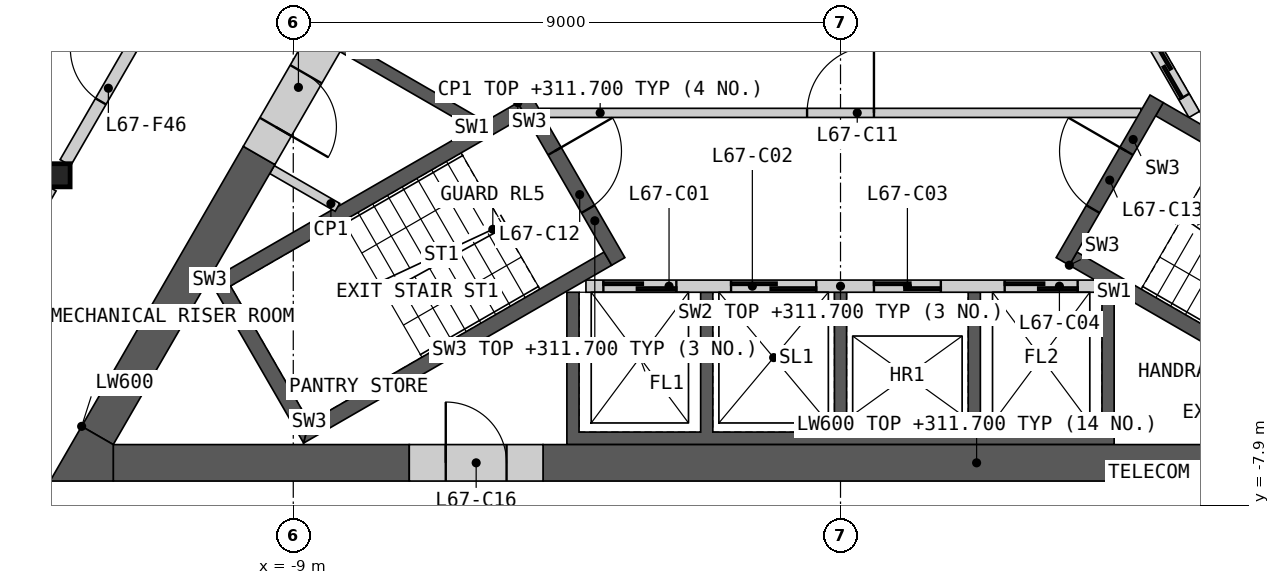
"""IFC4 building model, lengths in metres.
Left out: names, types, materials, properties, quantities, classifications, styles, units other than length and angle.
Written with IfcOpenShell. Run it as: python <this file> out.ifc"""

import sys

from ifc_helpers import new_model, si_unit, direction, frame, frame_2d, origin, origin_2d, place, context, subcontext, project, spatial, polyline, rectangle, i_section, outline, extrude, element, fill, save


model = new_model("IFC4")
c1 = context("Model", 3, precision=1e-05, world=origin(), true_north=direction((0.0, 1.0)))
c2 = subcontext(c1, "Body", "Model", "MODEL_VIEW")
j1 = project(units=[si_unit("LENGTHUNIT", "METRE"), si_unit("PLANEANGLEUNIT", "RADIAN")], contexts=[c1])
p1 = place(None, origin())
s1 = spatial("IfcSite", under=j1, at=p1, CompositionType="ELEMENT")
p2 = place(p1, origin())
s2 = spatial("IfcBuilding", under=s1, at=p2, CompositionType="ELEMENT")
p3 = place(p2, frame((0.0, 0.0, 308.6)))
s3 = spatial("IfcBuildingStorey", under=s2, at=p3, CompositionType="ELEMENT", Elevation=308.6)
p4 = place(p3, frame((-12.868, -2.476, 0.0), z_axis=(0.0, 0.0, 1.0), x_axis=(1.0, 0.0, 0.0)))
e1 = element("IfcColumn", 1, at=p4, inside=s3, PredefinedType="COLUMN", context=c2, shape_type="SweptSolid", body=[
    extrude(i_section(OverallWidth=0.396, OverallDepth=0.381, WebThickness=0.019, FlangeThickness=0.03, at=origin_2d()), origin(), (0.0, 0.0, 1.0), 3.4),
])
p5 = place(p3, origin())
e2 = element("IfcWall", 2, at=p5, inside=s3, PredefinedType="SHEAR", context=c2, shape_type="SweptSolid", body=[
    extrude(outline(polyline([(4.5, -4.4), (4.5, -6.906), (-4.5, -6.906), (-4.5, -4.4), (-4.3, -4.4), (-4.3, -6.7), (-2.3, -6.7), (-2.3, -4.4), (-2.1, -4.4), (-2.1, -6.7), (-0.1, -6.7), (-0.1, -4.4), (0.1, -4.4), (0.1, -6.7), (2.1, -6.7), (2.1, -4.4), (2.3, -4.4), (2.3, -6.7), (4.3, -6.7), (4.3, -4.4), (4.5, -4.4)])), origin(), (0.0, 0.0, 1.0), 3.1),
])
p6 = place(p3, frame((-4.187, -4.3, 0.0), z_axis=(0.0, 0.0, 1.0), x_axis=(1.0, 0.0, 0.0)))
e3 = element("IfcWall", 3, at=p6, inside=s3, PredefinedType="SOLIDWALL", context=c2, shape_type="SweptSolid", body=[
    extrude(rectangle(XDim=8.373, YDim=0.2, at=frame_2d((4.187, 0.0))), origin(), (0.0, 0.0, 1.0), 3.1),
])
p7 = place(p6, frame((0.287, 0.0, 0.0)))
e4 = element("IfcOpeningElement", 4, at=p7, cuts=e3, PredefinedType="OPENING", context=c2, shape_type="SweptSolid", body=[
    extrude(rectangle(XDim=1.2, YDim=2.1, at=frame_2d((0.6, 1.05))), frame((0.0, 0.11, 0.0), z_axis=(0.0, -1.0, 0.0), x_axis=(1.0, 0.0, 0.0)), (0.0, 0.0, 1.0), 0.22),
])
p8 = place(p6, frame((2.387, 0.0, 0.0)))
e5 = element("IfcOpeningElement", 5, at=p8, cuts=e3, PredefinedType="OPENING", context=c2, shape_type="SweptSolid", body=[
    extrude(rectangle(XDim=1.4, YDim=2.1, at=frame_2d((0.7, 1.05))), frame((0.0, 0.11, 0.0), z_axis=(0.0, -1.0, 0.0), x_axis=(1.0, 0.0, 0.0)), (0.0, 0.0, 1.0), 0.22),
])
p9 = place(p6, frame((4.737, 0.0, 0.0)))
e6 = element("IfcOpeningElement", 6, at=p9, cuts=e3, PredefinedType="OPENING", context=c2, shape_type="SweptSolid", body=[
    extrude(rectangle(XDim=1.1, YDim=2.1, at=frame_2d((0.55, 1.05))), frame((0.0, 0.11, 0.0), z_axis=(0.0, -1.0, 0.0), x_axis=(1.0, 0.0, 0.0)), (0.0, 0.0, 1.0), 0.22),
])
p10 = place(p6, frame((6.887, 0.0, 0.0)))
e7 = element("IfcOpeningElement", 7, at=p10, cuts=e3, PredefinedType="OPENING", context=c2, shape_type="SweptSolid", body=[
    extrude(rectangle(XDim=1.2, YDim=2.1, at=frame_2d((0.6, 1.05))), frame((0.0, 0.11, 0.0), z_axis=(0.0, -1.0, 0.0), x_axis=(1.0, 0.0, 0.0)), (0.0, 0.0, 1.0), 0.22),
])
p11 = place(p3, origin())
e8 = element("IfcWall", 8, at=p11, inside=s3, PredefinedType="SHEAR", context=c2, shape_type="SweptSolid", body=[
    extrude(outline(polyline([(1.561, 6.097), (3.731, 7.35), (8.231, -0.444), (6.061, -1.697), (5.96, -1.524), (7.952, -0.374), (6.952, 1.358), (4.96, 0.208), (4.861, 0.381), (6.852, 1.531), (5.852, 3.263), (3.861, 2.113), (3.76, 2.287), (5.752, 3.437), (4.752, 5.169), (2.76, 4.019), (2.66, 4.192), (4.652, 5.342), (3.652, 7.074), (1.66, 5.924), (1.561, 6.097)])), origin(), (0.0, 0.0, 1.0), 3.1),
])
p12 = place(p3, frame((5.817, -1.476, 0.0), z_axis=(0.0, 0.0, 1.0), x_axis=(-0.500002616675, 0.866023893041, 0.0)))
e9 = element("IfcWall", 9, at=p12, inside=s3, PredefinedType="SOLIDWALL", context=c2, shape_type="SweptSolid", body=[
    extrude(rectangle(XDim=8.373, YDim=0.2, at=frame_2d((4.187, 0.0))), origin(), (0.0, 0.0, 1.0), 3.1),
])
p13 = place(p12, frame((0.337, 0.0, 0.0)))
e10 = element("IfcOpeningElement", 10, at=p13, cuts=e9, PredefinedType="OPENING", context=c2, shape_type="SweptSolid", body=[
    extrude(rectangle(XDim=1.1, YDim=2.1, at=frame_2d((0.55, 1.05))), frame((0.0, 0.11, 0.0), z_axis=(0.0, -1.0, 0.0), x_axis=(1.0, 0.0, 0.0)), (0.0, 0.0, 1.0), 0.22),
])
p14 = place(p12, frame((2.537, 0.0, 0.0)))
e11 = element("IfcOpeningElement", 11, at=p14, cuts=e9, PredefinedType="OPENING", context=c2, shape_type="SweptSolid", body=[
    extrude(rectangle(XDim=1.1, YDim=2.1, at=frame_2d((0.55, 1.05))), frame((0.0, 0.11, 0.0), z_axis=(0.0, -1.0, 0.0), x_axis=(1.0, 0.0, 0.0)), (0.0, 0.0, 1.0), 0.22),
])
p15 = place(p12, frame((4.737, 0.0, 0.0)))
e12 = element("IfcOpeningElement", 12, at=p15, cuts=e9, PredefinedType="OPENING", context=c2, shape_type="SweptSolid", body=[
    extrude(rectangle(XDim=1.1, YDim=2.1, at=frame_2d((0.55, 1.05))), frame((0.0, 0.11, 0.0), z_axis=(0.0, -1.0, 0.0), x_axis=(1.0, 0.0, 0.0)), (0.0, 0.0, 1.0), 0.22),
])
p16 = place(p12, frame((7.037, 0.0, 0.0)))
e13 = element("IfcOpeningElement", 13, at=p16, cuts=e9, PredefinedType="OPENING", context=c2, shape_type="SweptSolid", body=[
    extrude(rectangle(XDim=0.9, YDim=2.1, at=frame_2d((0.45, 1.05))), frame((0.0, 0.11, 0.0), z_axis=(0.0, -1.0, 0.0), x_axis=(1.0, 0.0, 0.0)), (0.0, 0.0, 1.0), 0.22),
])
p17 = place(p3, origin())
e14 = element("IfcWall", 14, at=p17, inside=s3, PredefinedType="SHEAR", context=c2, shape_type="SweptSolid", body=[
    extrude(outline(polyline([(-6.061, -1.697), (-8.231, -0.444), (-8.131, -0.271), (-5.96, -1.524), (-6.061, -1.697)])), origin(), (0.0, 0.0, 1.0), 3.1),
])
p18 = place(p3, frame((-4.941, -1.45, 0.0), z_axis=(0.0, 0.0, 1.0), x_axis=(1.0, 0.0, 0.0)))
e15 = element("IfcWall", 15, at=p18, inside=s3, PredefinedType="PARTITIONING", context=c2, shape_type="SweptSolid", body=[
    extrude(rectangle(XDim=9.882, YDim=0.15, at=frame_2d((4.941, 0.0))), origin(), (0.0, 0.0, 1.0), 3.1),
])
p19 = place(p18, frame((4.391, 0.0, 0.0)))
e16 = element("IfcOpeningElement", 16, at=p19, cuts=e15, PredefinedType="OPENING", context=c2, shape_type="SweptSolid", body=[
    extrude(rectangle(XDim=1.1, YDim=2.1, at=frame_2d((0.55, 1.05))), frame((0.0, 0.085, 0.0), z_axis=(0.0, -1.0, 0.0), x_axis=(1.0, 0.0, 0.0)), (0.0, 0.0, 1.0), 0.17),
])
p20 = place(p3, origin())
e17 = element("IfcWall", 17, at=p20, inside=s3, PredefinedType="SHEAR", context=c2, shape_type="SweptSolid", body=[
    extrude(outline(polyline([(-5.307, -1.281), (-10.374, -4.206), (-10.032, -4.298), (-5.182, -1.498), (-5.307, -1.281)])), origin(), (0.0, 0.0, 1.0), 3.1),
])
p21 = place(p3, origin())
e18 = element("IfcWall", 18, at=p21, inside=s3, PredefinedType="SHEAR", context=c2, shape_type="SweptSolid", body=[
    extrude(outline(polyline([(-10.374, -4.206), (-8.83, -6.881), (-8.738, -6.539), (-10.032, -4.298), (-10.374, -4.206)])), origin(), (0.0, 0.0, 1.0), 3.1),
])
p22 = place(p3, origin())
e19 = element("IfcWall", 19, at=p22, inside=s3, PredefinedType="SHEAR", context=c2, shape_type="SweptSolid", body=[
    extrude(outline(polyline([(-8.738, -6.539), (-8.83, -6.881), (-3.763, -3.956), (-3.888, -3.739), (-8.738, -6.539)])), origin(), (0.0, 0.0, 1.0), 3.1),
])
p23 = place(p3, frame((-5.199, -1.219, 0.0), z_axis=(0.0, 0.0, 1.0), x_axis=(0.499982516597, -0.866035497597, 0.0)))
e20 = element("IfcWall", 20, at=p23, inside=s3, PredefinedType="SHEAR", context=c2, shape_type="SweptSolid", body=[
    extrude(rectangle(XDim=3.088, YDim=0.25, at=frame_2d((1.544, 0.0))), origin(), (0.0, 0.0, 1.0), 3.1),
])
p24 = place(p23, frame((0.994, 0.0, 0.0)))
e21 = element("IfcOpeningElement", 21, at=p24, cuts=e20, PredefinedType="OPENING", context=c2, shape_type="SweptSolid", body=[
    extrude(rectangle(XDim=1.1, YDim=2.1, at=frame_2d((0.55, 1.05))), frame((0.0, 0.135, 0.0), z_axis=(0.0, -1.0, 0.0), x_axis=(1.0, 0.0, 0.0)), (0.0, 0.0, 1.0), 0.27),
])
p25 = place(p3, origin())
e22 = element("IfcWall", 22, at=p25, inside=s3, PredefinedType="SHEAR", context=c2, shape_type="SweptSolid", body=[
    extrude(outline(polyline([(3.763, -3.956), (8.83, -6.881), (8.738, -6.539), (3.888, -3.739), (3.763, -3.956)])), origin(), (0.0, 0.0, 1.0), 3.1),
])
p26 = place(p3, origin())
e23 = element("IfcWall", 23, at=p26, inside=s3, PredefinedType="SHEAR", context=c2, shape_type="SweptSolid", body=[
    extrude(outline(polyline([(10.032, -4.298), (10.374, -4.206), (5.307, -1.281), (5.182, -1.498), (10.032, -4.298)])), origin(), (0.0, 0.0, 1.0), 3.1),
])
p27 = place(p3, frame((3.655, -3.893, 0.0), z_axis=(0.0, 0.0, 1.0), x_axis=(0.499982516597, 0.866035497597, 0.0)))
e24 = element("IfcWall", 24, at=p27, inside=s3, PredefinedType="SHEAR", context=c2, shape_type="SweptSolid", body=[
    extrude(rectangle(XDim=3.088, YDim=0.25, at=frame_2d((1.544, 0.0))), origin(), (0.0, 0.0, 1.0), 3.1),
])
p28 = place(p27, frame((0.994, 0.0, 0.0)))
e25 = element("IfcOpeningElement", 25, at=p28, cuts=e24, PredefinedType="OPENING", context=c2, shape_type="SweptSolid", body=[
    extrude(rectangle(XDim=1.1, YDim=2.1, at=frame_2d((0.55, 1.05))), frame((0.0, 0.135, 0.0), z_axis=(0.0, -1.0, 0.0), x_axis=(1.0, 0.0, 0.0)), (0.0, 0.0, 1.0), 0.27),
])
p29 = place(p3, frame((-9.35, -2.383, 0.0), z_axis=(0.0, 0.0, 1.0), x_axis=(0.866057962423, -0.499943602543, 0.0)))
e26 = element("IfcWall", 26, at=p29, inside=s3, PredefinedType="PARTITIONING", context=c2, shape_type="SweptSolid", body=[
    extrude(rectangle(XDim=1.242, YDim=0.15, at=frame_2d((0.621, 0.0))), origin(), (0.0, 0.0, 1.0), 3.1),
])
p30 = place(p3, frame((-4.892, -7.206, 0.0), z_axis=(0.0, 0.0, 1.0), x_axis=(1.0, 0.0, 0.0)))
e27 = element("IfcWall", 27, at=p30, inside=s3, PredefinedType="SHEAR", context=c2, shape_type="SweptSolid", body=[
    extrude(rectangle(XDim=14.261, YDim=0.6, at=frame_2d((7.13, 0.0))), origin(), (0.0, 0.0, 1.0), 3.1),
])
p31 = place(p3, frame((-11.961, -7.206, 0.0), z_axis=(0.0, 0.0, 1.0), x_axis=(1.0, 0.0, 0.0)))
e28 = element("IfcWall", 28, at=p31, inside=s3, PredefinedType="SHEAR", context=c2, shape_type="SweptSolid", body=[
    extrude(rectangle(XDim=4.868, YDim=0.6, at=frame_2d((2.434, 0.0))), origin(), (0.0, 0.0, 1.0), 3.1),
])
p32 = place(p3, frame((8.841, -0.902, 0.0), z_axis=(0.0, 0.0, 1.0), x_axis=(-0.499995618375, 0.866027933502, 0.0)))
e29 = element("IfcWall", 29, at=p32, inside=s3, PredefinedType="SHEAR", context=c2, shape_type="SweptSolid", body=[
    extrude(rectangle(XDim=14.571, YDim=0.6, at=frame_2d((7.285, 0.0))), origin(), (0.0, 0.0, 1.0), 3.1),
])
p33 = place(p3, frame((-9.562, -2.15, 0.0), z_axis=(0.0, 0.0, 1.0), x_axis=(-0.500015214976, -0.866016619236, 0.0)))
e30 = element("IfcWall", 30, at=p33, inside=s3, PredefinedType="SHEAR", context=c2, shape_type="SweptSolid", body=[
    extrude(rectangle(XDim=5.318, YDim=0.6, at=frame_2d((2.659, 0.0))), origin(), (0.0, 0.0, 1.0), 3.1),
])
p34 = place(p3, origin())
e31 = element("IfcWall", 31, at=p34, inside=s3, PredefinedType="SHEAR", context=c2, shape_type="SweptSolid", body=[
    extrude(outline(polyline([(-12.48, -6.606), (-11.961, -6.906), (-11.961, -7.506), (-13.0, -7.506), (-12.48, -6.606)])), origin(), (0.0, 0.0, 1.0), 3.1),
])
p35 = place(p3, frame((-7.092, -7.206, 0.0), z_axis=(0.0, 0.0, 1.0), x_axis=(1.0, 0.0, 0.0)))
e32 = element("IfcWall", 32, at=p35, inside=s3, PredefinedType="SHEAR", context=c2, shape_type="SweptSolid", body=[
    extrude(rectangle(XDim=2.2, YDim=0.6, at=frame_2d((1.1, 0.0))), origin(), (0.0, 0.0, 1.0), 3.1),
])
p36 = place(p35, frame((0.6, 0.0, 0.0)))
e33 = element("IfcOpeningElement", 33, at=p36, cuts=e32, PredefinedType="OPENING", context=c2, shape_type="SweptSolid", body=[
    extrude(rectangle(XDim=1.0, YDim=2.1, at=frame_2d((0.5, 1.05))), frame((0.0, 0.31, 0.0), z_axis=(0.0, -1.0, 0.0), x_axis=(1.0, 0.0, 0.0)), (0.0, 0.0, 1.0), 0.62),
])
p37 = place(p3, frame((-8.44, -0.208, 0.0), z_axis=(0.0, 0.0, 1.0), x_axis=(-0.500001951578, -0.866024277037, 0.0)))
e34 = element("IfcWall", 34, at=p37, inside=s3, PredefinedType="SHEAR", context=c2, shape_type="SweptSolid", body=[
    extrude(rectangle(XDim=2.243, YDim=0.6, at=frame_2d((1.122, 0.0))), origin(), (0.0, 0.0, 1.0), 3.1),
])
p38 = place(p37, frame((0.7, 0.0, 0.0)))
e35 = element("IfcOpeningElement", 35, at=p38, cuts=e34, PredefinedType="OPENING", context=c2, shape_type="SweptSolid", body=[
    extrude(rectangle(XDim=1.0, YDim=2.1, at=frame_2d((0.5, 1.05))), frame((0.0, 0.31, 0.0), z_axis=(0.0, -1.0, 0.0), x_axis=(1.0, 0.0, 0.0)), (0.0, 0.0, 1.0), 0.62),
])
p39 = place(p3, frame((-12.748, -2.269, 0.0), z_axis=(0.0, 0.0, 1.0), x_axis=(0.499984266882, 0.866034487114, 0.0)))
e36 = element("IfcWall", 36, at=p39, inside=s3, PredefinedType="PARTITIONING", context=c2, shape_type="SweptSolid", body=[
    extrude(rectangle(XDim=8.099, YDim=0.2, at=frame_2d((4.049, 0.0))), origin(), (0.0, 0.0, 1.0), 3.1),
])
p40 = place(p39, frame((1.164, 0.0, 0.0)))
e37 = element("IfcOpeningElement", 37, at=p40, cuts=e36, PredefinedType="OPENING", context=c2, shape_type="SweptSolid", body=[
    extrude(rectangle(XDim=1.0, YDim=2.1, at=frame_2d((0.5, 1.05))), frame((0.0, 0.11, 0.0), z_axis=(0.0, -1.0, 0.0), x_axis=(1.0, 0.0, 0.0)), (0.0, 0.0, 1.0), 0.22),
])
p41 = place(p3, frame((-15.131, -6.397, 0.0), z_axis=(0.0, 0.0, 1.0), x_axis=(0.500003406062, 0.866023437285, 0.0)))
e38 = element("IfcWall", 38, at=p41, inside=s3, PredefinedType="PARTITIONING", context=c2, shape_type="SweptSolid", body=[
    extrude(rectangle(XDim=4.288, YDim=0.2, at=frame_2d((2.144, 0.0))), origin(), (0.0, 0.0, 1.0), 3.1),
])
p42 = place(p7, origin())
e39 = element("IfcDoor", 39, at=p42, inside=s3, OperationType="SLIDING_TO_LEFT", PredefinedType="DOOR", context=c2, shape_type="SweptSolid", body=[
    extrude(rectangle(XDim=1.2, YDim=2.1, at=frame_2d((0.6, 1.05))), frame((0.0, 0.025, 0.0), z_axis=(0.0, -1.0, 0.0), x_axis=(1.0, 0.0, 0.0)), (0.0, 0.0, 1.0), 0.05),
])
fill(e4, e39)
p43 = place(p8, origin())
e40 = element("IfcDoor", 40, at=p43, inside=s3, OperationType="SLIDING_TO_LEFT", PredefinedType="DOOR", context=c2, shape_type="SweptSolid", body=[
    extrude(rectangle(XDim=1.4, YDim=2.1, at=frame_2d((0.7, 1.05))), frame((0.0, 0.025, 0.0), z_axis=(0.0, -1.0, 0.0), x_axis=(1.0, 0.0, 0.0)), (0.0, 0.0, 1.0), 0.05),
])
fill(e5, e40)
p44 = place(p9, origin())
e41 = element("IfcDoor", 41, at=p44, inside=s3, OperationType="SLIDING_TO_LEFT", PredefinedType="DOOR", context=c2, shape_type="SweptSolid", body=[
    extrude(rectangle(XDim=1.1, YDim=2.1, at=frame_2d((0.55, 1.05))), frame((0.0, 0.025, 0.0), z_axis=(0.0, -1.0, 0.0), x_axis=(1.0, 0.0, 0.0)), (0.0, 0.0, 1.0), 0.05),
])
fill(e6, e41)
p45 = place(p10, origin())
e42 = element("IfcDoor", 42, at=p45, inside=s3, OperationType="SLIDING_TO_LEFT", PredefinedType="DOOR", context=c2, shape_type="SweptSolid", body=[
    extrude(rectangle(XDim=1.2, YDim=2.1, at=frame_2d((0.6, 1.05))), frame((0.0, 0.025, 0.0), z_axis=(0.0, -1.0, 0.0), x_axis=(1.0, 0.0, 0.0)), (0.0, 0.0, 1.0), 0.05),
])
fill(e7, e42)
p46 = place(p13, origin())
e43 = element("IfcDoor", 43, at=p46, inside=s3, OperationType="SLIDING_TO_LEFT", PredefinedType="DOOR", context=c2, shape_type="SweptSolid", body=[
    extrude(rectangle(XDim=1.1, YDim=2.1, at=frame_2d((0.55, 1.05))), frame((0.0, 0.025, 0.0), z_axis=(0.0, -1.0, 0.0), x_axis=(1.0, 0.0, 0.0)), (0.0, 0.0, 1.0), 0.05),
])
fill(e10, e43)
p47 = place(p19, origin())
e44 = element("IfcDoor", 44, at=p47, inside=s3, OperationType="SINGLE_SWING_RIGHT", PredefinedType="DOOR", context=c2, shape_type="SweptSolid", body=[
    extrude(rectangle(XDim=1.1, YDim=2.1, at=frame_2d((0.55, 1.05))), frame((0.0, 0.025, 0.0), z_axis=(0.0, -1.0, 0.0), x_axis=(1.0, 0.0, 0.0)), (0.0, 0.0, 1.0), 0.05),
])
fill(e16, e44)
p48 = place(p24, origin())
e45 = element("IfcDoor", 45, at=p48, inside=s3, OperationType="SINGLE_SWING_LEFT", PredefinedType="DOOR", context=c2, shape_type="SweptSolid", body=[
    extrude(rectangle(XDim=1.1, YDim=2.1, at=frame_2d((0.55, 1.05))), frame((0.0, 0.025, 0.0), z_axis=(0.0, -1.0, 0.0), x_axis=(1.0, 0.0, 0.0)), (0.0, 0.0, 1.0), 0.05),
])
fill(e21, e45)
p49 = place(p28, origin())
e46 = element("IfcDoor", 46, at=p49, inside=s3, OperationType="SINGLE_SWING_RIGHT", PredefinedType="DOOR", context=c2, shape_type="SweptSolid", body=[
    extrude(rectangle(XDim=1.1, YDim=2.1, at=frame_2d((0.55, 1.05))), frame((0.0, 0.025, 0.0), z_axis=(0.0, -1.0, 0.0), x_axis=(1.0, 0.0, 0.0)), (0.0, 0.0, 1.0), 0.05),
])
fill(e25, e46)
p50 = place(p36, origin())
e47 = element("IfcDoor", 47, at=p50, inside=s3, OperationType="SINGLE_SWING_LEFT", PredefinedType="DOOR", context=c2, shape_type="SweptSolid", body=[
    extrude(rectangle(XDim=1.0, YDim=2.1, at=frame_2d((0.5, 1.05))), frame((0.0, 0.055, 0.0), z_axis=(0.0, -1.0, 0.0), x_axis=(1.0, 0.0, 0.0)), (0.0, 0.0, 1.0), 0.05),
])
fill(e33, e47)
p51 = place(p38, origin())
e48 = element("IfcDoor", 48, at=p51, inside=s3, OperationType="SINGLE_SWING_RIGHT", PredefinedType="DOOR", context=c2, shape_type="SweptSolid", body=[
    extrude(rectangle(XDim=1.0, YDim=2.1, at=frame_2d((0.5, 1.05))), frame((0.0, 0.055, 0.0), z_axis=(0.0, -1.0, 0.0), x_axis=(1.0, 0.0, 0.0)), (0.0, 0.0, 1.0), 0.05),
])
fill(e35, e48)
p52 = place(p40, origin())
e49 = element("IfcDoor", 49, at=p52, inside=s3, OperationType="SINGLE_SWING_RIGHT", PredefinedType="DOOR", context=c2, shape_type="SweptSolid", body=[
    extrude(rectangle(XDim=1.0, YDim=2.1, at=frame_2d((0.5, 1.05))), frame((0.0, 0.025, 0.0), z_axis=(0.0, -1.0, 0.0), x_axis=(1.0, 0.0, 0.0)), (0.0, 0.0, 1.0), 0.05),
])
fill(e37, e49)
save(model, sys.argv[1])
